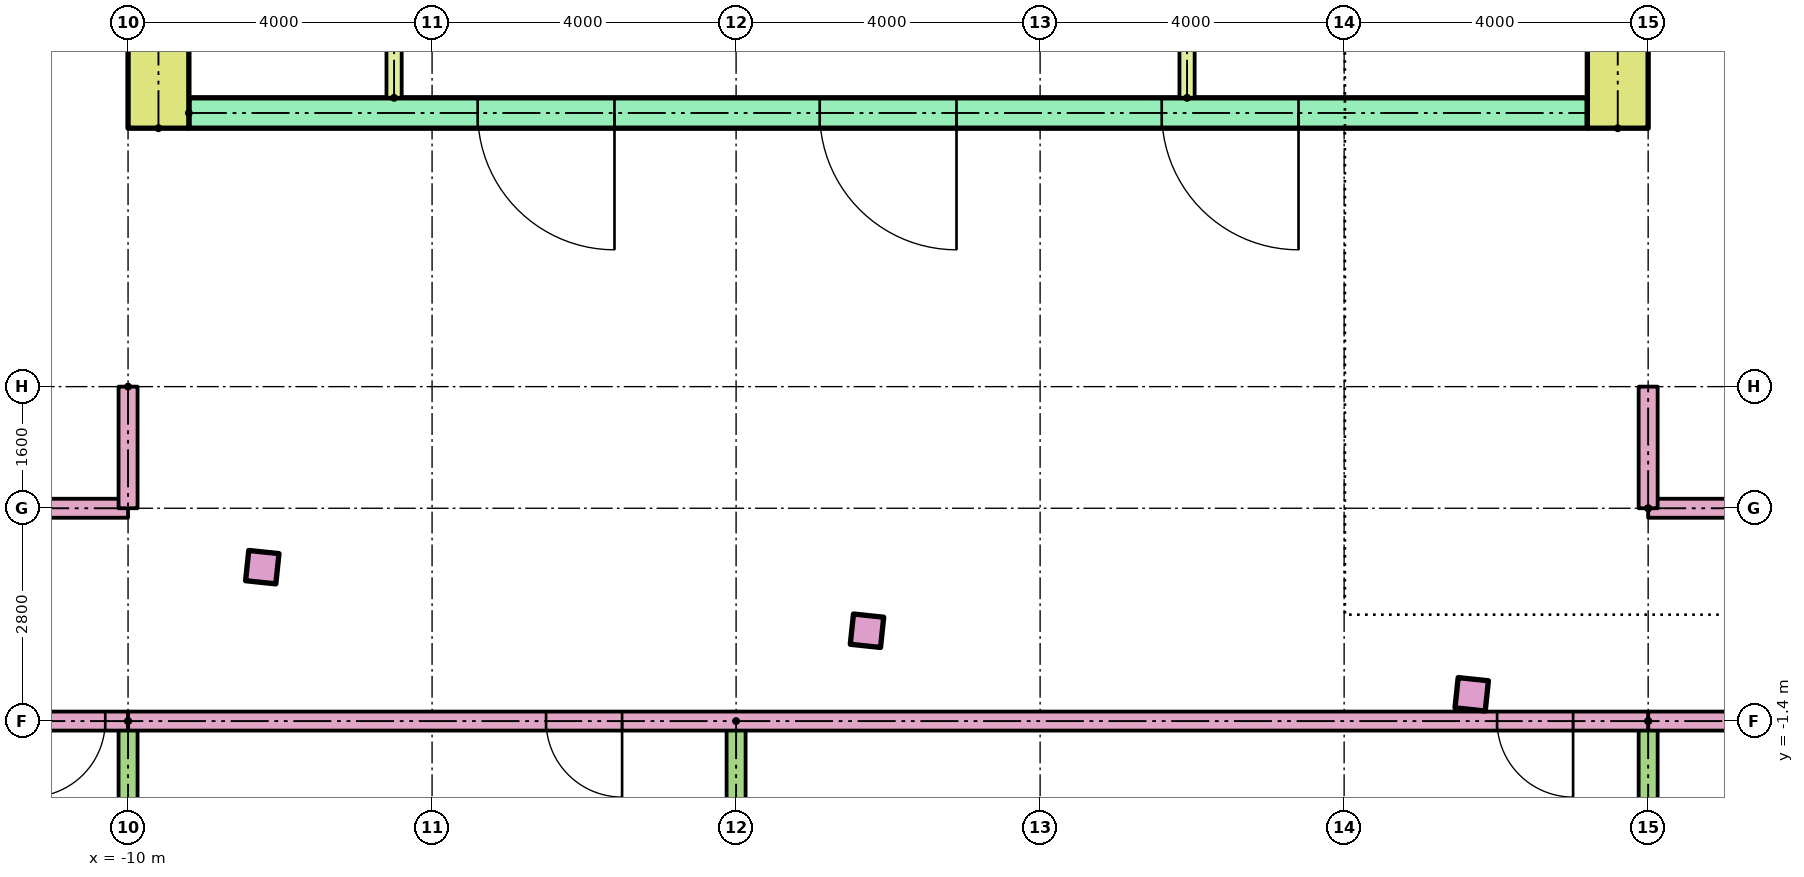
"""IFC4 building model, lengths in metres.
Left out: names, types, materials, properties, quantities, classifications, styles, units other than length and angle.
Written with IfcOpenShell. Run it as: python <this file> out.ifc"""

import sys

from ifc_helpers import new_model, si_unit, direction, frame, frame_2d, origin, origin_2d, place, context, subcontext, project, spatial, rectangle, extrude, element, fill, save


model = new_model("IFC4")
c1 = context("Model", 3, precision=1e-05, world=origin(), true_north=direction((0.0, 1.0)))
c2 = subcontext(c1, "Body", "Model", "MODEL_VIEW")
j1 = project(units=[si_unit("LENGTHUNIT", "METRE"), si_unit("PLANEANGLEUNIT", "RADIAN")], contexts=[c1])
p1 = place(None, origin())
s1 = spatial("IfcSite", under=j1, at=p1, CompositionType="ELEMENT")
p2 = place(p1, origin())
s2 = spatial("IfcBuilding", under=s1, at=p2, CompositionType="ELEMENT")
p3 = place(p2, frame((0.0, 0.0, 298.3)))
s3 = spatial("IfcBuildingStorey", under=s2, at=p3, CompositionType="ELEMENT", Elevation=298.3)
for number, where, z_axis, x_axis in (
    (1, (-8.234, 0.625, 0.0), (0.0, 0.0, 1.0), (0.995, -0.105, 0.0)),
    (2, (-0.278, -0.211, 0.0), (0.0, 0.0, 1.0), (0.995, -0.105, 0.0)),
    (3, (7.678, -1.048, 0.0), (0.0, 0.0, 1.0), (0.995, -0.105, 0.0)),
):
    element("IfcColumn", number, at=place(p3, frame(where, z_axis=z_axis, x_axis=x_axis)), inside=s3, PredefinedType="COLUMN", context=c2, shape_type="SweptSolid", body=[
        extrude(rectangle(XDim=0.4, YDim=0.4, at=origin_2d()), origin(), (0.0, 0.0, 1.0), 3.4),
    ])
for number, where, z_axis, x_axis in (
    (4, (-9.6, 6.4, 0.0), (0.0, 0.0, 1.0), (0.0, 1.0, 0.0)),
    (5, (9.6, 6.4, 0.0), (0.0, 0.0, 1.0), (0.0, 1.0, 0.0)),
):
    element("IfcWall", number, at=place(p3, frame(where, z_axis=z_axis, x_axis=x_axis)), inside=s3, PredefinedType="SHEAR", context=c2, shape_type="SweptSolid", body=[
        extrude(rectangle(XDim=13.6, YDim=0.8, at=frame_2d((6.8, 0.0))), origin(), (0.0, 0.0, 1.0), 2.9),
    ])
p4 = place(p3, frame((-9.2, 6.6, 0.0)))
e6 = element("IfcWall", 6, at=p4, inside=s3, PredefinedType="SHEAR", context=c2, shape_type="SweptSolid", body=[
    extrude(rectangle(XDim=18.4, YDim=0.4, at=frame_2d((9.2, 0.0))), origin(), (0.0, 0.0, 1.0), 2.9),
])
p5 = place(p4, frame((8.3, 0.0, 0.0)))
e7 = element("IfcOpeningElement", 7, at=p5, cuts=e6, PredefinedType="OPENING", context=c2, shape_type="SweptSolid", body=[
    extrude(rectangle(XDim=1.8, YDim=2.1, at=frame_2d((0.9, 1.05))), frame((0.0, 0.21, 0.0), z_axis=(0.0, -1.0, 0.0), x_axis=(1.0, 0.0, 0.0)), (0.0, 0.0, 1.0), 0.42),
])
p6 = place(p4, frame((3.8, 0.0, 0.0)))
e8 = element("IfcOpeningElement", 8, at=p6, cuts=e6, PredefinedType="OPENING", context=c2, shape_type="SweptSolid", body=[
    extrude(rectangle(XDim=1.8, YDim=2.1, at=frame_2d((0.9, 1.05))), frame((0.0, 0.21, 0.0), z_axis=(0.0, -1.0, 0.0), x_axis=(1.0, 0.0, 0.0)), (0.0, 0.0, 1.0), 0.42),
])
p7 = place(p4, frame((12.8, 0.0, 0.0)))
e9 = element("IfcOpeningElement", 9, at=p7, cuts=e6, PredefinedType="OPENING", context=c2, shape_type="SweptSolid", body=[
    extrude(rectangle(XDim=1.8, YDim=2.1, at=frame_2d((0.9, 1.05))), frame((0.0, 0.21, 0.0), z_axis=(0.0, -1.0, 0.0), x_axis=(1.0, 0.0, 0.0)), (0.0, 0.0, 1.0), 0.42),
])
p8 = place(p3, frame((3.933, 6.8, 0.0), z_axis=(0.0, 0.0, 1.0), x_axis=(0.0, 1.0, 0.0)))
e10 = element("IfcWall", 10, at=p8, inside=s3, PredefinedType="PARTITIONING", context=c2, shape_type="SweptSolid", body=[
    extrude(rectangle(XDim=3.3, YDim=0.2, at=frame_2d((1.65, 0.0))), origin(), (0.0, 0.0, 1.0), 2.9),
])
p9 = place(p8, frame((1.1, 0.0, 0.0)))
e11 = element("IfcOpeningElement", 11, at=p9, cuts=e10, PredefinedType="OPENING", context=c2, shape_type="SweptSolid", body=[
    extrude(rectangle(XDim=1.1, YDim=2.1, at=frame_2d((0.55, 1.05))), frame((0.0, 0.11, 0.0), z_axis=(0.0, -1.0, 0.0), x_axis=(1.0, 0.0, 0.0)), (0.0, 0.0, 1.0), 0.22),
])
p10 = place(p3, frame((-6.5, 6.8, 0.0), z_axis=(0.0, 0.0, 1.0), x_axis=(0.0, 1.0, 0.0)))
e12 = element("IfcWall", 12, at=p10, inside=s3, PredefinedType="PARTITIONING", context=c2, shape_type="SweptSolid", body=[
    extrude(rectangle(XDim=3.3, YDim=0.2, at=frame_2d((1.65, 0.0))), origin(), (0.0, 0.0, 1.0), 2.9),
])
p11 = place(p10, frame((1.15, 0.0, 0.0)))
e13 = element("IfcOpeningElement", 13, at=p11, cuts=e12, PredefinedType="OPENING", context=c2, shape_type="SweptSolid", body=[
    extrude(rectangle(XDim=1.0, YDim=2.1, at=frame_2d((0.5, 1.05))), frame((0.0, 0.11, 0.0), z_axis=(0.0, -1.0, 0.0), x_axis=(1.0, 0.0, 0.0)), (0.0, 0.0, 1.0), 0.22),
])
p12 = place(p3, frame((-10.0, -1.4, 0.0), z_axis=(0.0, 0.0, 1.0), x_axis=(-1.0, 0.0, 0.0)))
e14 = element("IfcWall", 14, at=p12, inside=s3, PredefinedType="PARTITIONING", context=c2, shape_type="SweptSolid", body=[
    extrude(rectangle(XDim=12.0, YDim=0.25, at=frame_2d((6.0, 0.0))), origin(), (0.0, 0.0, 1.0), 2.6),
])
p13 = place(p12, frame((0.3, 0.0, 0.0)))
e15 = element("IfcOpeningElement", 15, at=p13, cuts=e14, PredefinedType="OPENING", context=c2, shape_type="SweptSolid", body=[
    extrude(rectangle(XDim=1.0, YDim=2.1, at=frame_2d((0.5, 1.05))), frame((0.0, 0.135, 0.0), z_axis=(0.0, -1.0, 0.0), x_axis=(1.0, 0.0, 0.0)), (0.0, 0.0, 1.0), 0.27),
])
p14 = place(p12, frame((5.5, 0.0, 0.0)))
e16 = element("IfcOpeningElement", 16, at=p14, cuts=e14, PredefinedType="OPENING", context=c2, shape_type="SweptSolid", body=[
    extrude(rectangle(XDim=1.0, YDim=2.1, at=frame_2d((0.5, 1.05))), frame((0.0, 0.135, 0.0), z_axis=(0.0, -1.0, 0.0), x_axis=(1.0, 0.0, 0.0)), (0.0, 0.0, 1.0), 0.27),
])
p15 = place(p3, frame((-10.0, -1.4, 0.0), z_axis=(0.0, 0.0, 1.0), x_axis=(0.0, -1.0, 0.0)))
e17 = element("IfcWall", 17, at=p15, inside=s3, PredefinedType="PARTITIONING", context=c2, shape_type="SweptSolid", body=[
    extrude(rectangle(XDim=12.491, YDim=0.25, at=frame_2d((6.246, 0.0))), origin(), (0.0, 0.0, 1.0), 2.6),
])
p16 = place(p3, frame((-22.0, 1.4, 0.0)))
e18 = element("IfcWall", 18, at=p16, inside=s3, PredefinedType="PARTITIONING", context=c2, shape_type="SweptSolid", body=[
    extrude(rectangle(XDim=12.0, YDim=0.25, at=frame_2d((6.0, 0.0))), origin(), (0.0, 0.0, 1.0), 2.6),
])
p17 = place(p16, frame((9.5, 0.0, 0.0)))
e19 = element("IfcOpeningElement", 19, at=p17, cuts=e18, PredefinedType="OPENING", context=c2, shape_type="SweptSolid", body=[
    extrude(rectangle(XDim=1.0, YDim=2.1, at=frame_2d((0.5, 1.05))), frame((0.0, 0.135, 0.0), z_axis=(0.0, -1.0, 0.0), x_axis=(1.0, 0.0, 0.0)), (0.0, 0.0, 1.0), 0.27),
])
p18 = place(p3, frame((25.0, -1.4, 0.0), z_axis=(0.0, 0.0, 1.0), x_axis=(-1.0, 0.0, 0.0)))
e20 = element("IfcWall", 20, at=p18, inside=s3, PredefinedType="PARTITIONING", context=c2, shape_type="SweptSolid", body=[
    extrude(rectangle(XDim=15.0, YDim=0.25, at=frame_2d((7.5, 0.0))), origin(), (0.0, 0.0, 1.0), 2.6),
])
p19 = place(p18, frame((12.5, 0.0, 0.0)))
e21 = element("IfcOpeningElement", 21, at=p19, cuts=e20, PredefinedType="OPENING", context=c2, shape_type="SweptSolid", body=[
    extrude(rectangle(XDim=1.0, YDim=2.1, at=frame_2d((0.5, 1.05))), frame((0.0, 0.135, 0.0), z_axis=(0.0, -1.0, 0.0), x_axis=(1.0, 0.0, 0.0)), (0.0, 0.0, 1.0), 0.27),
])
p20 = place(p18, frame((1.743, 0.0, 0.0)))
e22 = element("IfcOpeningElement", 22, at=p20, cuts=e20, PredefinedType="OPENING", context=c2, shape_type="SweptSolid", body=[
    extrude(rectangle(XDim=1.0, YDim=2.1, at=frame_2d((0.5, 1.05))), frame((0.0, 0.135, 0.0), z_axis=(0.0, -1.0, 0.0), x_axis=(1.0, 0.0, 0.0)), (0.0, 0.0, 1.0), 0.27),
])
p21 = place(p3, frame((10.0, -1.4, 0.0), z_axis=(0.0, 0.0, 1.0), x_axis=(0.0, -1.0, 0.0)))
e23 = element("IfcWall", 23, at=p21, inside=s3, PredefinedType="PARTITIONING", context=c2, shape_type="SweptSolid", body=[
    extrude(rectangle(XDim=14.593, YDim=0.25, at=frame_2d((7.297, 0.0))), origin(), (0.0, 0.0, 1.0), 2.6),
])
p22 = place(p3, frame((10.0, 1.4, 0.0)))
e24 = element("IfcWall", 24, at=p22, inside=s3, PredefinedType="PARTITIONING", context=c2, shape_type="SweptSolid", body=[
    extrude(rectangle(XDim=15.0, YDim=0.25, at=frame_2d((7.5, 0.0))), origin(), (0.0, 0.0, 1.0), 2.6),
])
p23 = place(p22, frame((1.5, 0.0, 0.0)))
e25 = element("IfcOpeningElement", 25, at=p23, cuts=e24, PredefinedType="OPENING", context=c2, shape_type="SweptSolid", body=[
    extrude(rectangle(XDim=1.0, YDim=2.1, at=frame_2d((0.5, 1.05))), frame((0.0, 0.135, 0.0), z_axis=(0.0, -1.0, 0.0), x_axis=(1.0, 0.0, 0.0)), (0.0, 0.0, 1.0), 0.27),
])
p24 = place(p22, frame((12.675, 0.0, 0.0)))
e26 = element("IfcOpeningElement", 26, at=p24, cuts=e24, PredefinedType="OPENING", context=c2, shape_type="SweptSolid", body=[
    extrude(rectangle(XDim=1.0, YDim=2.1, at=frame_2d((0.5, 1.05))), frame((0.0, 0.135, 0.0), z_axis=(0.0, -1.0, 0.0), x_axis=(1.0, 0.0, 0.0)), (0.0, 0.0, 1.0), 0.27),
])
p25 = place(p3, frame((-2.0, -1.4, 0.0), z_axis=(0.0, 0.0, 1.0), x_axis=(0.0, -1.0, 0.0)))
e27 = element("IfcWall", 27, at=p25, inside=s3, PredefinedType="PARTITIONING", context=c2, shape_type="SweptSolid", body=[
    extrude(rectangle(XDim=13.332, YDim=0.25, at=frame_2d((6.666, 0.0))), origin(), (0.0, 0.0, 1.0), 2.6),
])
p26 = place(p3, frame((10.0, -1.4, 0.0), z_axis=(0.0, 0.0, 1.0), x_axis=(-1.0, 0.0, 0.0)))
e28 = element("IfcWall", 28, at=p26, inside=s3, PredefinedType="PARTITIONING", context=c2, shape_type="SweptSolid", body=[
    extrude(rectangle(XDim=20.0, YDim=0.25, at=frame_2d((10.0, 0.0))), origin(), (0.0, 0.0, 1.0), 2.6),
])
p27 = place(p26, frame((13.5, 0.0, 0.0)))
e29 = element("IfcOpeningElement", 29, at=p27, cuts=e28, PredefinedType="OPENING", context=c2, shape_type="SweptSolid", body=[
    extrude(rectangle(XDim=1.0, YDim=2.1, at=frame_2d((0.5, 1.05))), frame((0.0, 0.135, 0.0), z_axis=(0.0, -1.0, 0.0), x_axis=(1.0, 0.0, 0.0)), (0.0, 0.0, 1.0), 0.27),
])
p28 = place(p26, frame((0.988, 0.0, 0.0)))
e30 = element("IfcOpeningElement", 30, at=p28, cuts=e28, PredefinedType="OPENING", context=c2, shape_type="SweptSolid", body=[
    extrude(rectangle(XDim=1.0, YDim=2.1, at=frame_2d((0.5, 1.05))), frame((0.0, 0.135, 0.0), z_axis=(0.0, -1.0, 0.0), x_axis=(1.0, 0.0, 0.0)), (0.0, 0.0, 1.0), 0.27),
])
for number, where, z_axis, x_axis in (
    (31, (-10.0, 3.0, 0.0), (0.0, 0.0, 1.0), (0.0, -1.0, 0.0)),
    (32, (10.0, 1.4, 0.0), (0.0, 0.0, 1.0), (0.0, 1.0, 0.0)),
):
    element("IfcWall", number, at=place(p3, frame(where, z_axis=z_axis, x_axis=x_axis)), inside=s3, PredefinedType="PARTITIONING", context=c2, shape_type="SweptSolid", body=[
        extrude(rectangle(XDim=1.6, YDim=0.25, at=frame_2d((0.8, 0.0))), origin(), (0.0, 0.0, 1.0), 2.6),
    ])
p29 = place(p5, frame((1.8, 0.0, 0.0), z_axis=(0.0, 0.0, 1.0), x_axis=(-1.0, 0.0, 0.0)))
e33 = element("IfcDoor", 33, at=p29, inside=s3, OperationType="DOUBLE_DOOR_SINGLE_SWING", PredefinedType="DOOR", context=c2, shape_type="SweptSolid", body=[
    extrude(rectangle(XDim=1.8, YDim=2.1, at=frame_2d((0.9, 1.05))), frame((0.0, 0.025, 0.0), z_axis=(0.0, -1.0, 0.0), x_axis=(1.0, 0.0, 0.0)), (0.0, 0.0, 1.0), 0.05),
])
fill(e7, e33)
p30 = place(p6, frame((1.8, 0.0, 0.0), z_axis=(0.0, 0.0, 1.0), x_axis=(-1.0, 0.0, 0.0)))
e34 = element("IfcDoor", 34, at=p30, inside=s3, OperationType="DOUBLE_DOOR_SINGLE_SWING", PredefinedType="DOOR", context=c2, shape_type="SweptSolid", body=[
    extrude(rectangle(XDim=1.8, YDim=2.1, at=frame_2d((0.9, 1.05))), frame((0.0, 0.025, 0.0), z_axis=(0.0, -1.0, 0.0), x_axis=(1.0, 0.0, 0.0)), (0.0, 0.0, 1.0), 0.05),
])
fill(e8, e34)
p31 = place(p7, frame((1.8, 0.0, 0.0), z_axis=(0.0, 0.0, 1.0), x_axis=(-1.0, 0.0, 0.0)))
e35 = element("IfcDoor", 35, at=p31, inside=s3, OperationType="DOUBLE_DOOR_SINGLE_SWING", PredefinedType="DOOR", context=c2, shape_type="SweptSolid", body=[
    extrude(rectangle(XDim=1.8, YDim=2.1, at=frame_2d((0.9, 1.05))), frame((0.0, 0.025, 0.0), z_axis=(0.0, -1.0, 0.0), x_axis=(1.0, 0.0, 0.0)), (0.0, 0.0, 1.0), 0.05),
])
fill(e9, e35)
p32 = place(p13, origin())
e36 = element("IfcDoor", 36, at=p32, inside=s3, OperationType="SINGLE_SWING_RIGHT", PredefinedType="DOOR", context=c2, shape_type="SweptSolid", body=[
    extrude(rectangle(XDim=1.0, YDim=2.1, at=frame_2d((0.5, 1.05))), frame((0.0, 0.025, 0.0), z_axis=(0.0, -1.0, 0.0), x_axis=(1.0, 0.0, 0.0)), (0.0, 0.0, 1.0), 0.05),
])
fill(e15, e36)
p33 = place(p27, origin())
e37 = element("IfcDoor", 37, at=p33, inside=s3, OperationType="SINGLE_SWING_LEFT", PredefinedType="DOOR", context=c2, shape_type="SweptSolid", body=[
    extrude(rectangle(XDim=1.0, YDim=2.1, at=frame_2d((0.5, 1.05))), frame((0.0, 0.025, 0.0), z_axis=(0.0, -1.0, 0.0), x_axis=(1.0, 0.0, 0.0)), (0.0, 0.0, 1.0), 0.05),
])
fill(e29, e37)
p34 = place(p28, origin())
e38 = element("IfcDoor", 38, at=p34, inside=s3, OperationType="SINGLE_SWING_LEFT", PredefinedType="DOOR", context=c2, shape_type="SweptSolid", body=[
    extrude(rectangle(XDim=1.0, YDim=2.1, at=frame_2d((0.5, 1.05))), frame((0.0, 0.025, 0.0), z_axis=(0.0, -1.0, 0.0), x_axis=(1.0, 0.0, 0.0)), (0.0, 0.0, 1.0), 0.05),
])
fill(e30, e38)
save(model, sys.argv[1])
